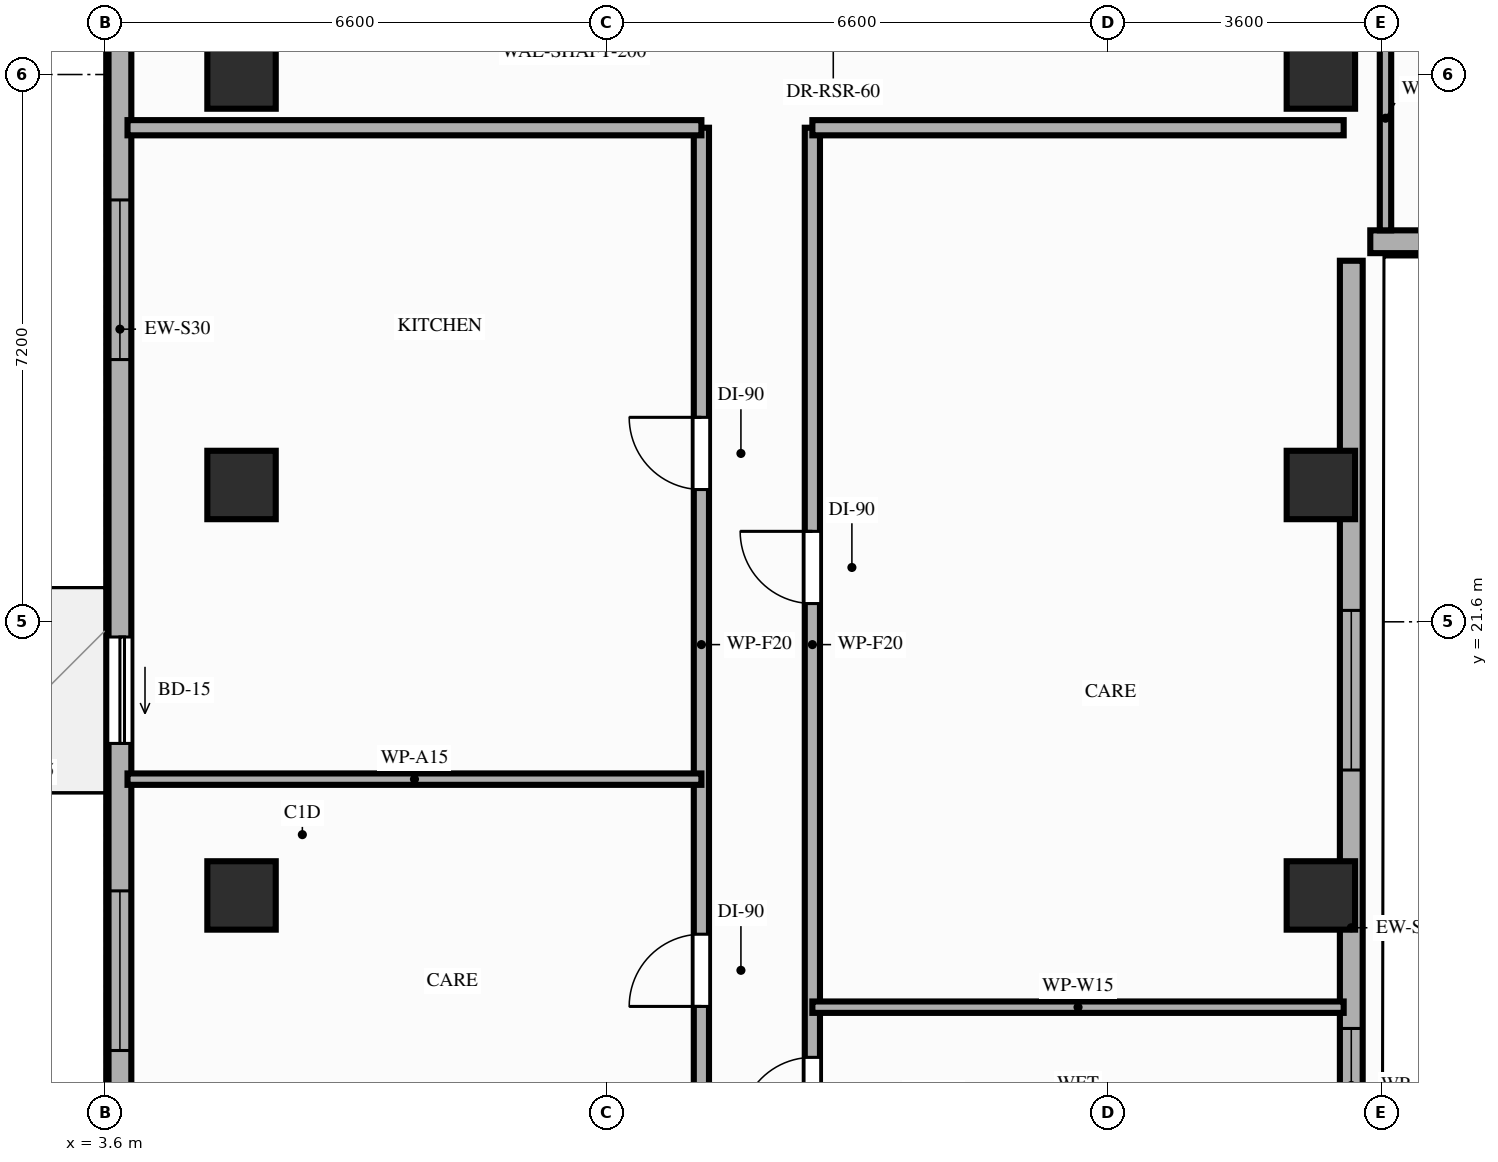
"""IFC4 building model, lengths in metres.
Left out: names, types, materials, properties, quantities, classifications, styles, units other than length and angle.
Written with IfcOpenShell. Run it as: python <this file> out.ifc"""

import sys

from ifc_helpers import new_model, si_unit, direction, frame, frame_2d, origin, origin_2d, place, context, subcontext, project, spatial, rectangle, extrude, element, fill, save


model = new_model("IFC4")
c1 = context("Model", 3, precision=1e-05, world=origin(), true_north=direction((0.0, 1.0)))
c2 = subcontext(c1, "Body", "Model", "MODEL_VIEW")
j1 = project(units=[si_unit("LENGTHUNIT", "METRE"), si_unit("PLANEANGLEUNIT", "RADIAN")], contexts=[c1])
p1 = place(None, origin())
s1 = spatial("IfcSite", under=j1, at=p1, CompositionType="ELEMENT")
p2 = place(p1, origin())
s2 = spatial("IfcBuilding", under=s1, at=p2, CompositionType="ELEMENT")
p3 = place(p2, frame((0.0, 0.0, 172.8)))
s3 = spatial("IfcBuildingStorey", under=s2, at=p3, CompositionType="ELEMENT", Elevation=172.8)
for number, where, z_axis, x_axis in (
    (1, (5.4, 18.0, 0.0), (0.0, 0.0, 1.0), (1.0, 0.0, 0.0)),
    (2, (19.6, 18.0, 0.0), (0.0, 0.0, 1.0), (1.0, 0.0, 0.0)),
    (3, (5.4, 23.4, 0.0), (0.0, 0.0, 1.0), (1.0, 0.0, 0.0)),
    (4, (19.6, 23.4, 0.0), (0.0, 0.0, 1.0), (1.0, 0.0, 0.0)),
    (5, (5.4, 28.8, 0.0), (0.0, 0.0, 1.0), (1.0, 0.0, 0.0)),
    (6, (19.6, 28.8, 0.0), (0.0, 0.0, 1.0), (1.0, 0.0, 0.0)),
):
    element("IfcColumn", number, at=place(p3, frame(where, z_axis=z_axis, x_axis=x_axis)), inside=s3, PredefinedType="COLUMN", context=c2, shape_type="SweptSolid", body=[
        extrude(rectangle(XDim=0.9, YDim=0.9, at=origin_2d()), origin(), (0.0, 0.0, 1.0), 3.2),
    ])
p4 = place(p3, frame((3.8, 42.1, 0.0), z_axis=(0.0, 0.0, 1.0), x_axis=(0.0, -1.0, 0.0)))
e7 = element("IfcWall", 7, at=p4, inside=s3, PredefinedType="STANDARD", context=c2, shape_type="SweptSolid", body=[
    extrude(rectangle(XDim=33.3, YDim=0.3, at=frame_2d((16.65, 0.0))), origin(), (0.0, 0.0, 1.0), 2.71),
])
p5 = place(p4, frame((20.7, 0.0, 0.0)))
e8 = element("IfcOpeningElement", 8, at=p5, cuts=e7, PredefinedType="OPENING", context=c2, shape_type="SweptSolid", body=[
    extrude(rectangle(XDim=1.4, YDim=2.1, at=frame_2d((0.7, 1.05))), frame((0.0, 0.16, 0.0), z_axis=(0.0, -1.0, 0.0), x_axis=(1.0, 0.0, 0.0)), (0.0, 0.0, 1.0), 0.32),
])
p6 = place(p4, frame((29.33, 0.0, 0.85)))
e9 = element("IfcOpeningElement", 9, at=p6, cuts=e7, PredefinedType="OPENING", context=c2, shape_type="SweptSolid", body=[
    extrude(rectangle(XDim=2.1, YDim=1.61, at=frame_2d((1.05, 0.805))), frame((0.0, 0.16, 0.0), z_axis=(0.0, -1.0, 0.0), x_axis=(1.0, 0.0, 0.0)), (0.0, 0.0, 1.0), 0.32),
])
p7 = place(p4, frame((24.04, 0.0, 0.85)))
e10 = element("IfcOpeningElement", 10, at=p7, cuts=e7, PredefinedType="OPENING", context=c2, shape_type="SweptSolid", body=[
    extrude(rectangle(XDim=2.1, YDim=1.61, at=frame_2d((1.05, 0.805))), frame((0.0, 0.16, 0.0), z_axis=(0.0, -1.0, 0.0), x_axis=(1.0, 0.0, 0.0)), (0.0, 0.0, 1.0), 0.32),
])
p8 = place(p4, frame((14.95, 0.0, 0.85)))
e11 = element("IfcOpeningElement", 11, at=p8, cuts=e7, PredefinedType="OPENING", context=c2, shape_type="SweptSolid", body=[
    extrude(rectangle(XDim=2.1, YDim=1.61, at=frame_2d((1.05, 0.805))), frame((0.0, 0.16, 0.0), z_axis=(0.0, -1.0, 0.0), x_axis=(1.0, 0.0, 0.0)), (0.0, 0.0, 1.0), 0.32),
])
p9 = place(p4, frame((9.75, 0.0, 0.85)))
e12 = element("IfcOpeningElement", 12, at=p9, cuts=e7, PredefinedType="OPENING", context=c2, shape_type="SweptSolid", body=[
    extrude(rectangle(XDim=2.1, YDim=1.61, at=frame_2d((1.05, 0.805))), frame((0.0, 0.16, 0.0), z_axis=(0.0, -1.0, 0.0), x_axis=(1.0, 0.0, 0.0)), (0.0, 0.0, 1.0), 0.32),
])
p10 = place(p4, frame((3.65, 0.0, 0.85)))
e13 = element("IfcOpeningElement", 13, at=p10, cuts=e7, PredefinedType="OPENING", context=c2, shape_type="SweptSolid", body=[
    extrude(rectangle(XDim=2.1, YDim=1.61, at=frame_2d((1.05, 0.805))), frame((0.0, 0.16, 0.0), z_axis=(0.0, -1.0, 0.0), x_axis=(1.0, 0.0, 0.0)), (0.0, 0.0, 1.0), 0.32),
])
p11 = place(p3, frame((20.0, 8.8, 0.0), z_axis=(0.0, 0.0, 1.0), x_axis=(0.0, 1.0, 0.0)))
e14 = element("IfcWall", 14, at=p11, inside=s3, PredefinedType="STANDARD", context=c2, shape_type="SweptSolid", body=[
    extrude(rectangle(XDim=17.55, YDim=0.3, at=frame_2d((8.775, 0.0))), origin(), (0.0, 0.0, 1.0), 2.45),
])
p12 = place(p11, frame((4.58, 0.0, 0.85)))
e15 = element("IfcOpeningElement", 15, at=p12, cuts=e14, PredefinedType="OPENING", context=c2, shape_type="SweptSolid", body=[
    extrude(rectangle(XDim=0.8, YDim=1.35, at=frame_2d((0.4, 0.675))), frame((0.0, 0.16, 0.0), z_axis=(0.0, -1.0, 0.0), x_axis=(1.0, 0.0, 0.0)), (0.0, 0.0, 1.0), 0.32),
])
p13 = place(p11, frame((5.95, 0.0, 0.85)))
e16 = element("IfcOpeningElement", 16, at=p13, cuts=e14, PredefinedType="OPENING", context=c2, shape_type="SweptSolid", body=[
    extrude(rectangle(XDim=1.5, YDim=1.35, at=frame_2d((0.75, 0.675))), frame((0.0, 0.16, 0.0), z_axis=(0.0, -1.0, 0.0), x_axis=(1.0, 0.0, 0.0)), (0.0, 0.0, 1.0), 0.32),
])
p14 = place(p11, frame((10.85, 0.0, 0.85)))
e17 = element("IfcOpeningElement", 17, at=p14, cuts=e14, PredefinedType="OPENING", context=c2, shape_type="SweptSolid", body=[
    extrude(rectangle(XDim=2.1, YDim=1.35, at=frame_2d((1.05, 0.675))), frame((0.0, 0.16, 0.0), z_axis=(0.0, -1.0, 0.0), x_axis=(1.0, 0.0, 0.0)), (0.0, 0.0, 1.0), 0.32),
])
p15 = place(p3, frame((20.25, 26.6, 0.0), z_axis=(0.0, 0.0, 1.0), x_axis=(1.0, 0.0, 0.0)))
e18 = element("IfcWall", 18, at=p15, inside=s3, PredefinedType="STANDARD", context=c2, shape_type="SweptSolid", body=[
    extrude(rectangle(XDim=21.35, YDim=0.3, at=frame_2d((10.675, 0.0))), origin(), (0.0, 0.0, 1.0), 2.71),
])
p16 = place(p15, frame((7.95, 0.0, 0.0)))
e19 = element("IfcOpeningElement", 19, at=p16, cuts=e18, PredefinedType="OPENING", context=c2, shape_type="SweptSolid", body=[
    extrude(rectangle(XDim=1.4, YDim=2.1, at=frame_2d((0.7, 1.05))), frame((0.0, 0.16, 0.0), z_axis=(0.0, -1.0, 0.0), x_axis=(1.0, 0.0, 0.0)), (0.0, 0.0, 1.0), 0.32),
])
p17 = place(p15, frame((2.5, 0.0, 0.85)))
e20 = element("IfcOpeningElement", 20, at=p17, cuts=e18, PredefinedType="OPENING", context=c2, shape_type="SweptSolid", body=[
    extrude(rectangle(XDim=2.1, YDim=1.61, at=frame_2d((1.05, 0.805))), frame((0.0, 0.16, 0.0), z_axis=(0.0, -1.0, 0.0), x_axis=(1.0, 0.0, 0.0)), (0.0, 0.0, 1.0), 0.32),
])
p18 = place(p15, frame((18.43, 0.0, 0.85)))
e21 = element("IfcOpeningElement", 21, at=p18, cuts=e18, PredefinedType="OPENING", context=c2, shape_type="SweptSolid", body=[
    extrude(rectangle(XDim=2.1, YDim=1.61, at=frame_2d((1.05, 0.805))), frame((0.0, 0.16, 0.0), z_axis=(0.0, -1.0, 0.0), x_axis=(1.0, 0.0, 0.0)), (0.0, 0.0, 1.0), 0.32),
])
p19 = place(p15, frame((11.54, 0.0, 0.85)))
e22 = element("IfcOpeningElement", 22, at=p19, cuts=e18, PredefinedType="OPENING", context=c2, shape_type="SweptSolid", body=[
    extrude(rectangle(XDim=2.1, YDim=1.61, at=frame_2d((1.05, 0.805))), frame((0.0, 0.16, 0.0), z_axis=(0.0, -1.0, 0.0), x_axis=(1.0, 0.0, 0.0)), (0.0, 0.0, 1.0), 0.32),
])
p20 = place(p15, frame((15.23, 0.0, 0.85)))
e23 = element("IfcOpeningElement", 23, at=p20, cuts=e18, PredefinedType="OPENING", context=c2, shape_type="SweptSolid", body=[
    extrude(rectangle(XDim=2.1, YDim=1.61, at=frame_2d((1.05, 0.805))), frame((0.0, 0.16, 0.0), z_axis=(0.0, -1.0, 0.0), x_axis=(1.0, 0.0, 0.0)), (0.0, 0.0, 1.0), 0.32),
])
p21 = place(p3, frame((11.45, 14.5, 0.0), z_axis=(0.0, 0.0, 1.0), x_axis=(0.0, 1.0, 0.0)))
e24 = element("IfcWall", 24, at=p21, inside=s3, PredefinedType="PARTITIONING", context=c2, shape_type="SweptSolid", body=[
    extrude(rectangle(XDim=13.6, YDim=0.2, at=frame_2d((6.8, 0.0))), origin(), (0.0, 0.0, 1.0), 2.45),
])
p22 = place(p21, frame((2.04, 0.0, 0.0)))
e25 = element("IfcOpeningElement", 25, at=p22, cuts=e24, PredefinedType="OPENING", context=c2, shape_type="SweptSolid", body=[
    extrude(rectangle(XDim=0.95, YDim=2.15, at=frame_2d((0.475, 1.075))), frame((0.0, 0.11, 0.0), z_axis=(0.0, -1.0, 0.0), x_axis=(1.0, 0.0, 0.0)), (0.0, 0.0, 1.0), 0.22),
])
p23 = place(p21, frame((8.84, 0.0, 0.0)))
e26 = element("IfcOpeningElement", 26, at=p23, cuts=e24, PredefinedType="OPENING", context=c2, shape_type="SweptSolid", body=[
    extrude(rectangle(XDim=0.95, YDim=2.15, at=frame_2d((0.475, 1.075))), frame((0.0, 0.11, 0.0), z_axis=(0.0, -1.0, 0.0), x_axis=(1.0, 0.0, 0.0)), (0.0, 0.0, 1.0), 0.22),
])
p24 = place(p3, frame((12.91, 14.5, 0.0), z_axis=(0.0, 0.0, 1.0), x_axis=(0.0, 1.0, 0.0)))
e27 = element("IfcWall", 27, at=p24, inside=s3, PredefinedType="PARTITIONING", context=c2, shape_type="SweptSolid", body=[
    extrude(rectangle(XDim=13.6, YDim=0.2, at=frame_2d((6.8, 0.0))), origin(), (0.0, 0.0, 1.0), 2.45),
])
p25 = place(p24, frame((0.42, 0.0, 0.0)))
e28 = element("IfcOpeningElement", 28, at=p25, cuts=e27, PredefinedType="OPENING", context=c2, shape_type="SweptSolid", body=[
    extrude(rectangle(XDim=0.95, YDim=2.1, at=frame_2d((0.475, 1.05))), frame((0.0, 0.11, 0.0), z_axis=(0.0, -1.0, 0.0), x_axis=(1.0, 0.0, 0.0)), (0.0, 0.0, 1.0), 0.22),
])
p26 = place(p24, frame((7.34, 0.0, 0.0)))
e29 = element("IfcOpeningElement", 29, at=p26, cuts=e27, PredefinedType="OPENING", context=c2, shape_type="SweptSolid", body=[
    extrude(rectangle(XDim=0.95, YDim=2.15, at=frame_2d((0.475, 1.075))), frame((0.0, 0.11, 0.0), z_axis=(0.0, -1.0, 0.0), x_axis=(1.0, 0.0, 0.0)), (0.0, 0.0, 1.0), 0.22),
])
p27 = place(p3, frame((3.9, 28.1, 0.0), z_axis=(0.0, 0.0, 1.0), x_axis=(1.0, 0.0, 0.0)))
e30 = element("IfcWall", 30, at=p27, inside=s3, PredefinedType="PARTITIONING", context=c2, shape_type="SweptSolid", body=[
    extrude(rectangle(XDim=7.55, YDim=0.2, at=frame_2d((3.775, 0.0))), origin(), (0.0, 0.0, 1.0), 2.45),
])
p28 = place(p3, frame((12.91, 28.1, 0.0), z_axis=(0.0, 0.0, 1.0), x_axis=(1.0, 0.0, 0.0)))
e31 = element("IfcWall", 31, at=p28, inside=s3, PredefinedType="PARTITIONING", context=c2, shape_type="SweptSolid", body=[
    extrude(rectangle(XDim=6.99, YDim=0.2, at=frame_2d((3.495, 0.0))), origin(), (0.0, 0.0, 1.0), 2.45),
])
p29 = place(p3, frame((20.45, 26.75, 0.0), z_axis=(0.0, 0.0, 1.0), x_axis=(0.0, 1.0, 0.0)))
e32 = element("IfcWall", 32, at=p29, inside=s3, PredefinedType="PARTITIONING", context=c2, shape_type="SweptSolid", body=[
    extrude(rectangle(XDim=2.95, YDim=0.15, at=frame_2d((1.475, 0.0))), origin(), (0.0, 0.0, 1.0), 2.45),
])
p30 = place(p3, frame((3.9, 19.53, 0.0), z_axis=(0.0, 0.0, 1.0), x_axis=(1.0, 0.0, 0.0)))
e33 = element("IfcWall", 33, at=p30, inside=s3, PredefinedType="PARTITIONING", context=c2, shape_type="SweptSolid", body=[
    extrude(rectangle(XDim=7.55, YDim=0.15, at=frame_2d((3.775, 0.0))), origin(), (0.0, 0.0, 1.0), 2.45),
])
p31 = place(p3, frame((12.91, 16.53, 0.0), z_axis=(0.0, 0.0, 1.0), x_axis=(1.0, 0.0, 0.0)))
e34 = element("IfcWall", 34, at=p31, inside=s3, PredefinedType="PARTITIONING", context=c2, shape_type="SweptSolid", body=[
    extrude(rectangle(XDim=6.99, YDim=0.15, at=frame_2d((3.495, 0.0))), origin(), (0.0, 0.0, 1.0), 2.45),
])
p32 = place(p5, origin())
e35 = element("IfcDoor", 35, at=p32, inside=s3, OperationType="SLIDING_TO_RIGHT", PredefinedType="DOOR", context=c2, shape_type="SweptSolid", body=[
    extrude(rectangle(XDim=1.4, YDim=2.1, at=frame_2d((0.7, 1.05))), frame((0.0, 0.025, 0.0), z_axis=(0.0, -1.0, 0.0), x_axis=(1.0, 0.0, 0.0)), (0.0, 0.0, 1.0), 0.05),
])
fill(e8, e35)
p33 = place(p7, origin())
e36 = element("IfcWindow", 36, at=p33, inside=s3, PartitioningType="SINGLE_PANEL", PredefinedType="WINDOW", context=c2, shape_type="SweptSolid", body=[
    extrude(rectangle(XDim=2.1, YDim=1.61, at=frame_2d((1.05, 0.805))), frame((0.0, 0.03, 0.0), z_axis=(0.0, -1.0, 0.0), x_axis=(1.0, 0.0, 0.0)), (0.0, 0.0, 1.0), 0.06),
])
fill(e10, e36)
p34 = place(p8, origin())
e37 = element("IfcWindow", 37, at=p34, inside=s3, PartitioningType="SINGLE_PANEL", PredefinedType="WINDOW", context=c2, shape_type="SweptSolid", body=[
    extrude(rectangle(XDim=2.1, YDim=1.61, at=frame_2d((1.05, 0.805))), frame((0.0, 0.03, 0.0), z_axis=(0.0, -1.0, 0.0), x_axis=(1.0, 0.0, 0.0)), (0.0, 0.0, 1.0), 0.06),
])
fill(e11, e37)
p35 = place(p13, origin())
e38 = element("IfcWindow", 38, at=p35, inside=s3, PartitioningType="SINGLE_PANEL", PredefinedType="WINDOW", context=c2, shape_type="SweptSolid", body=[
    extrude(rectangle(XDim=1.5, YDim=1.35, at=frame_2d((0.75, 0.675))), frame((0.0, 0.03, 0.0), z_axis=(0.0, -1.0, 0.0), x_axis=(1.0, 0.0, 0.0)), (0.0, 0.0, 1.0), 0.06),
])
fill(e16, e38)
p36 = place(p14, origin())
e39 = element("IfcWindow", 39, at=p36, inside=s3, PartitioningType="SINGLE_PANEL", PredefinedType="WINDOW", context=c2, shape_type="SweptSolid", body=[
    extrude(rectangle(XDim=2.1, YDim=1.35, at=frame_2d((1.05, 0.675))), frame((0.0, 0.03, 0.0), z_axis=(0.0, -1.0, 0.0), x_axis=(1.0, 0.0, 0.0)), (0.0, 0.0, 1.0), 0.06),
])
fill(e17, e39)
p37 = place(p22, origin())
e40 = element("IfcDoor", 40, at=p37, inside=s3, OperationType="SINGLE_SWING_LEFT", PredefinedType="DOOR", context=c2, shape_type="SweptSolid", body=[
    extrude(rectangle(XDim=0.95, YDim=2.15, at=frame_2d((0.475, 1.075))), frame((0.0, 0.025, 0.0), z_axis=(0.0, -1.0, 0.0), x_axis=(1.0, 0.0, 0.0)), (0.0, 0.0, 1.0), 0.05),
])
fill(e25, e40)
p38 = place(p23, origin())
e41 = element("IfcDoor", 41, at=p38, inside=s3, OperationType="SINGLE_SWING_RIGHT", PredefinedType="DOOR", context=c2, shape_type="SweptSolid", body=[
    extrude(rectangle(XDim=0.95, YDim=2.15, at=frame_2d((0.475, 1.075))), frame((0.0, 0.025, 0.0), z_axis=(0.0, -1.0, 0.0), x_axis=(1.0, 0.0, 0.0)), (0.0, 0.0, 1.0), 0.05),
])
fill(e26, e41)
p39 = place(p25, origin())
e42 = element("IfcDoor", 42, at=p39, inside=s3, OperationType="SINGLE_SWING_LEFT", PredefinedType="DOOR", context=c2, shape_type="SweptSolid", body=[
    extrude(rectangle(XDim=0.95, YDim=2.1, at=frame_2d((0.475, 1.05))), frame((0.0, 0.025, 0.0), z_axis=(0.0, -1.0, 0.0), x_axis=(1.0, 0.0, 0.0)), (0.0, 0.0, 1.0), 0.05),
])
fill(e28, e42)
p40 = place(p26, origin())
e43 = element("IfcDoor", 43, at=p40, inside=s3, OperationType="SINGLE_SWING_RIGHT", PredefinedType="DOOR", context=c2, shape_type="SweptSolid", body=[
    extrude(rectangle(XDim=0.95, YDim=2.15, at=frame_2d((0.475, 1.075))), frame((0.0, 0.025, 0.0), z_axis=(0.0, -1.0, 0.0), x_axis=(1.0, 0.0, 0.0)), (0.0, 0.0, 1.0), 0.05),
])
fill(e29, e43)
save(model, sys.argv[1])
